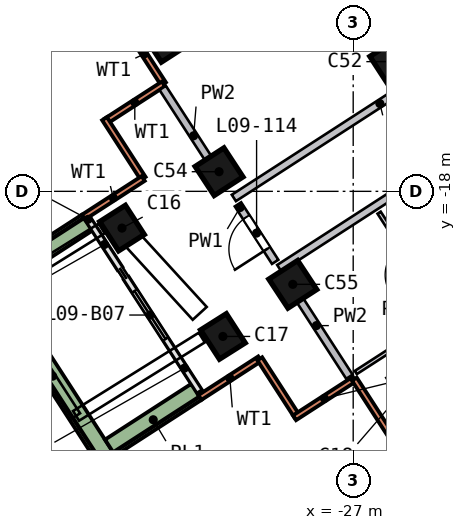
"""IFC4 building model, lengths in metres.
Left out: names, types, materials, properties, quantities, classifications, styles, units other than length and angle.
Written with IfcOpenShell. Run it as: python <this file> out.ifc"""

import sys

from ifc_helpers import new_model, si_unit, direction, frame, frame_2d, origin, origin_2d, place, context, subcontext, project, spatial, rectangle, extrude, element, fill, save


model = new_model("IFC4")
c1 = context("Model", 3, precision=1e-05, world=origin(), true_north=direction((0.0, 1.0)))
c2 = subcontext(c1, "Body", "Model", "MODEL_VIEW")
j1 = project(units=[si_unit("LENGTHUNIT", "METRE"), si_unit("PLANEANGLEUNIT", "RADIAN")], contexts=[c1])
p1 = place(None, origin())
s1 = spatial("IfcSite", under=j1, at=p1, CompositionType="ELEMENT")
p2 = place(p1, origin())
s2 = spatial("IfcBuilding", under=s1, at=p2, CompositionType="ELEMENT")
p3 = place(p2, frame((0.0, 0.0, 46.0)))
s3 = spatial("IfcBuildingStorey", under=s2, at=p3, CompositionType="ELEMENT", Elevation=46.0)
p4 = place(p3, frame((-32.021, -13.865, 0.0), z_axis=(0.106613269, -0.123903948, 0.986550264), x_axis=(-0.837760285, -0.54559437, 0.02201111)))
e1 = element("IfcColumn", 1, at=p4, inside=s3, PredefinedType="COLUMN", context=c2, shape_type="SweptSolid", body=[
    extrude(rectangle(XDim=0.9, YDim=0.8, at=origin_2d()), origin(), (0.0, 0.0, 1.0), 3.233),
])
p5 = place(p3, frame((-33.242, -18.81, 0.0), z_axis=(0.129644072, -0.129042126, 0.983127939), x_axis=(0.528268693, -0.830077524, -0.178615484)))
e2 = element("IfcColumn", 2, at=p5, inside=s3, PredefinedType="COLUMN", context=c2, shape_type="SweptSolid", body=[
    extrude(rectangle(XDim=0.9, YDim=0.8, at=origin_2d()), origin(), (0.0, 0.0, 1.0), 3.245),
])
p6 = place(p3, frame((-30.603, -21.676, 0.0), z_axis=(0.142996831, -0.1164435, 0.982849336), x_axis=(0.52613126, -0.832172984, -0.175140005)))
e3 = element("IfcColumn", 3, at=p6, inside=s3, PredefinedType="COLUMN", context=c2, shape_type="SweptSolid", body=[
    extrude(rectangle(XDim=0.9, YDim=0.8, at=origin_2d()), origin(), (0.0, 0.0, 1.0), 3.246),
])
p7 = place(p3, frame((-25.658, -22.897, 0.0), z_axis=(0.148731573, -0.093352796, 0.984461363), x_axis=(0.831226085, 0.551077806, -0.073324268)))
e4 = element("IfcColumn", 4, at=p7, inside=s3, PredefinedType="COLUMN", context=c2, shape_type="SweptSolid", body=[
    extrude(rectangle(XDim=0.9, YDim=0.8, at=origin_2d()), origin(), (0.0, 0.0, 1.0), 3.24),
])
p8 = place(p3, frame((-26.043, -14.454, 0.0), z_axis=(0.089555062, -0.109405677, 0.98995469), x_axis=(-0.838496243, -0.544682378, 0.015657524)))
e5 = element("IfcColumn", 5, at=p8, inside=s3, PredefinedType="COLUMN", context=c2, shape_type="SweptSolid", body=[
    extrude(rectangle(XDim=0.9, YDim=0.9, at=origin_2d()), origin(), (0.0, 0.0, 1.0), 3.222),
])
p9 = place(p3, frame((-30.679, -17.34, 0.0), z_axis=(0.12286311, -0.117281851, 0.98546924), x_axis=(-0.835614152, -0.547932789, 0.038969843)))
e6 = element("IfcColumn", 6, at=p9, inside=s3, PredefinedType="COLUMN", context=c2, shape_type="SweptSolid", body=[
    extrude(rectangle(XDim=0.9, YDim=0.9, at=origin_2d()), origin(), (0.0, 0.0, 1.0), 3.237),
])
p10 = place(p3, frame((-28.756, -20.315, 0.0), z_axis=(0.13678321, -0.10807004, 0.984688387), x_axis=(-0.833459883, -0.549792202, 0.055436068)))
e7 = element("IfcColumn", 7, at=p10, inside=s3, PredefinedType="COLUMN", context=c2, shape_type="SweptSolid", body=[
    extrude(rectangle(XDim=0.9, YDim=0.9, at=origin_2d()), origin(), (0.0, 0.0, 1.0), 3.24),
])
p11 = place(p3, frame((-33.009, -13.598, 0.0), z_axis=(0.0, 0.0, 1.0), x_axis=(0.542894866, -0.839800669, 0.0)))
e8 = element("IfcWall", 8, at=p11, inside=s3, PredefinedType="SOLIDWALL", context=c2, shape_type="SweptSolid", body=[
    extrude(rectangle(XDim=1.875, YDim=0.15, at=frame_2d((0.938, 0.0))), origin(), (0.0, 0.0, 1.0), 3.19),
])
p12 = place(p3, frame((-31.991, -15.173, 0.0), z_axis=(0.0, 0.0, 1.0), x_axis=(-0.839752067, -0.542970041, 0.0)))
e9 = element("IfcWall", 9, at=p12, inside=s3, PredefinedType="SOLIDWALL", context=c2, shape_type="SweptSolid", body=[
    extrude(rectangle(XDim=1.8, YDim=0.15, at=frame_2d((0.9, 0.0))), origin(), (0.0, 0.0, 1.0), 3.19),
])
p13 = place(p3, frame((-33.543, -16.087, 0.0), z_axis=(0.0, 0.0, 1.0), x_axis=(0.5428355, -0.839839044, 0.0)))
e10 = element("IfcWall", 10, at=p13, inside=s3, PredefinedType="SOLIDWALL", context=c2, shape_type="SweptSolid", body=[
    extrude(rectangle(XDim=1.875, YDim=0.15, at=frame_2d((0.938, 0.0))), origin(), (0.0, 0.0, 1.0), 3.19),
])
p14 = place(p3, frame((-32.526, -17.662, 0.0), z_axis=(0.0, 0.0, 1.0), x_axis=(-0.839800669, -0.542894866, 0.0)))
e11 = element("IfcWall", 11, at=p14, inside=s3, PredefinedType="SOLIDWALL", context=c2, shape_type="SweptSolid", body=[
    extrude(rectangle(XDim=1.875, YDim=0.15, at=frame_2d((0.938, 0.0))), origin(), (0.0, 0.0, 1.0), 3.19),
])
p15 = place(p3, frame((-31.033, -23.425, 0.0), z_axis=(0.0, 0.0, 1.0), x_axis=(0.839839044, 0.5428355, 0.0)))
e12 = element("IfcWall", 12, at=p15, inside=s3, PredefinedType="SOLIDWALL", context=c2, shape_type="SweptSolid", body=[
    extrude(rectangle(XDim=1.875, YDim=0.15, at=frame_2d((0.938, 0.0))), origin(), (0.0, 0.0, 1.0), 3.19),
])
p16 = place(p3, frame((-29.458, -22.407, 0.0), z_axis=(0.0, 0.0, 1.0), x_axis=(0.54281254, -0.839853884, 0.0)))
e13 = element("IfcWall", 13, at=p16, inside=s3, PredefinedType="SOLIDWALL", context=c2, shape_type="SweptSolid", body=[
    extrude(rectangle(XDim=1.8, YDim=0.15, at=frame_2d((0.9, 0.0))), origin(), (0.0, 0.0, 1.0), 3.19),
])
p17 = place(p3, frame((-28.544, -23.959, 0.0), z_axis=(0.0, 0.0, 1.0), x_axis=(0.839839044, 0.5428355, 0.0)))
e14 = element("IfcWall", 14, at=p17, inside=s3, PredefinedType="SOLIDWALL", context=c2, shape_type="SweptSolid", body=[
    extrude(rectangle(XDim=1.875, YDim=0.15, at=frame_2d((0.938, 0.0))), origin(), (0.0, 0.0, 1.0), 3.19),
])
p18 = place(p3, frame((-26.969, -22.941, 0.0), z_axis=(0.0, 0.0, 1.0), x_axis=(0.54292733, -0.839779682, 0.0)))
e15 = element("IfcWall", 15, at=p18, inside=s3, PredefinedType="SOLIDWALL", context=c2, shape_type="SweptSolid", body=[
    extrude(rectangle(XDim=1.875, YDim=0.15, at=frame_2d((0.938, 0.0))), origin(), (0.0, 0.0, 1.0), 3.19),
])
p19 = place(p3, frame((-32.97, -20.289, 0.0), z_axis=(0.0, 0.0, 1.0), x_axis=(0.542849741, -0.839829839, 0.0)))
e16 = element("IfcWall", 16, at=p19, inside=s3, PredefinedType="SOLIDWALL", context=c2, shape_type="SweptSolid", body=[
    extrude(rectangle(XDim=3.53, YDim=0.15, at=frame_2d((1.765, 0.0))), origin(), (0.0, 0.0, 1.0), 2.425),
])
p20 = place(p19, frame((0.4, 0.0, 0.0)))
e17 = element("IfcOpeningElement", 17, at=p20, cuts=e16, PredefinedType="OPENING", context=c2, shape_type="SweptSolid", body=[
    extrude(rectangle(XDim=1.5, YDim=2.4, at=frame_2d((0.75, 1.2))), frame((0.0, 0.085, 0.0), z_axis=(0.0, -1.0, 0.0), x_axis=(1.0, 0.0, 0.0)), (0.0, 0.0, 1.0), 0.17),
])
p21 = place(p3, frame((-33.953, -18.769, 0.0), z_axis=(0.0, 0.0, 1.0), x_axis=(0.54292733, -0.839779682, 0.0)))
e18 = element("IfcWall", 18, at=p21, inside=s3, PredefinedType="SOLIDWALL", context=c2, shape_type="SweptSolid", body=[
    extrude(rectangle(XDim=1.5, YDim=0.15, at=frame_2d((0.75, 0.0))), origin(), (0.0, 0.0, 1.0), 2.425),
])
p22 = place(p3, frame((-34.006, -18.827, 0.0), z_axis=(0.0, 0.0, 1.0), x_axis=(-0.839787127, -0.542915814, 0.0)))
e19 = element("IfcWall", 19, at=p22, inside=s3, PredefinedType="SOLIDWALL", context=c2, shape_type="SweptSolid", body=[
    extrude(rectangle(XDim=3.199, YDim=0.5, at=frame_2d((1.6, 0.0))), origin(), (0.0, 0.0, 1.0), 0.7),
])
p23 = place(p3, frame((-36.347, -20.638, 0.0), z_axis=(0.0, 0.0, 1.0), x_axis=(0.542876861, -0.839812309, 0.0)))
e20 = element("IfcWall", 20, at=p23, inside=s3, PredefinedType="SOLIDWALL", context=c2, shape_type="SweptSolid", body=[
    extrude(rectangle(XDim=5.3, YDim=0.5, at=frame_2d((2.65, 0.0))), origin(), (0.0, 0.0, 1.0), 0.7),
])
p24 = place(p3, frame((-33.396, -24.743, 0.0), z_axis=(0.0, 0.0, 1.0), x_axis=(0.839815165, 0.542872442, 0.0)))
e21 = element("IfcWall", 21, at=p24, inside=s3, PredefinedType="SOLIDWALL", context=c2, shape_type="SweptSolid", body=[
    extrude(rectangle(XDim=2.699, YDim=0.5, at=frame_2d((1.35, 0.0))), origin(), (0.0, 0.0, 1.0), 0.7),
])
p25 = place(p3, frame((-29.054, -19.855, 0.0), z_axis=(0.0, 0.0, 1.0), x_axis=(-0.54276244, 0.839886262, 0.0)))
e22 = element("IfcWall", 22, at=p25, inside=s3, PredefinedType="SOLIDWALL", context=c2, shape_type="SweptSolid", body=[
    extrude(rectangle(XDim=1.802, YDim=0.2, at=frame_2d((0.901, 0.0))), origin(), (0.0, 0.0, 1.0), 3.19),
])
p26 = place(p25, frame((0.4, 0.0, 0.0)))
e23 = element("IfcOpeningElement", 23, at=p26, cuts=e22, PredefinedType="OPENING", context=c2, shape_type="SweptSolid", body=[
    extrude(rectangle(XDim=1.0, YDim=2.1, at=frame_2d((0.5, 1.05))), frame((0.0, 0.11, 0.0), z_axis=(0.0, -1.0, 0.0), x_axis=(1.0, 0.0, 0.0)), (0.0, 0.0, 1.0), 0.22),
])
p27 = place(p3, frame((-30.14, -18.174, 0.0), z_axis=(0.0, 0.0, 1.0), x_axis=(0.839812753, 0.542876173, 0.0)))
e24 = element("IfcWall", 24, at=p27, inside=s3, PredefinedType="SOLIDWALL", context=c2, shape_type="SweptSolid", body=[
    extrude(rectangle(XDim=17.22, YDim=0.2, at=frame_2d((8.61, 0.0))), origin(), (0.0, 0.0, 1.0), 3.19),
])
p28 = place(p27, frame((9.35, 0.0, 0.0)))
e25 = element("IfcOpeningElement", 25, at=p28, cuts=e24, PredefinedType="OPENING", context=c2, shape_type="SweptSolid", body=[
    extrude(rectangle(XDim=1.0, YDim=2.1, at=frame_2d((0.5, 1.05))), frame((0.0, 0.11, 0.0), z_axis=(0.0, -1.0, 0.0), x_axis=(1.0, 0.0, 0.0)), (0.0, 0.0, 1.0), 0.22),
])
p29 = place(p3, frame((-14.316, -10.564, 0.0), z_axis=(0.0, 0.0, 1.0), x_axis=(-0.839811096, -0.542878738, 0.0)))
e26 = element("IfcWall", 26, at=p29, inside=s3, PredefinedType="SOLIDWALL", context=c2, shape_type="SweptSolid", body=[
    extrude(rectangle(XDim=17.42, YDim=0.2, at=frame_2d((8.71, 0.0))), origin(), (0.0, 0.0, 1.0), 3.19),
])
p30 = place(p29, frame((12.7, 0.0, 0.0)))
e27 = element("IfcOpeningElement", 27, at=p30, cuts=e26, PredefinedType="OPENING", context=c2, shape_type="SweptSolid", body=[
    extrude(rectangle(XDim=1.0, YDim=2.1, at=frame_2d((0.5, 1.05))), frame((0.0, 0.11, 0.0), z_axis=(0.0, -1.0, 0.0), x_axis=(1.0, 0.0, 0.0)), (0.0, 0.0, 1.0), 0.22),
])
p31 = place(p3, frame((-32.013, -15.277, 0.0), z_axis=(0.0, 0.0, 1.0), x_axis=(0.54288039, -0.839810027, 0.0)))
e28 = element("IfcWall", 28, at=p31, inside=s3, PredefinedType="SOLIDWALL", context=c2, shape_type="SweptSolid", body=[
    extrude(rectangle(XDim=3.003, YDim=0.2, at=frame_2d((1.501, 0.0))), origin(), (0.0, 0.0, 1.0), 3.19),
])
p32 = place(p3, frame((-28.839, -20.188, 0.0), z_axis=(0.0, 0.0, 1.0), x_axis=(0.542881592, -0.83980925, 0.0)))
e29 = element("IfcWall", 29, at=p32, inside=s3, PredefinedType="SOLIDWALL", context=c2, shape_type="SweptSolid", body=[
    extrude(rectangle(XDim=3.204, YDim=0.2, at=frame_2d((1.602, 0.0))), origin(), (0.0, 0.0, 1.0), 3.19),
])
p33 = place(p3, frame((-24.665, -21.302, 0.0), z_axis=(0.0, 0.0, 1.0), x_axis=(-0.839812661, -0.542876316, 0.0)))
e30 = element("IfcWall", 30, at=p33, inside=s3, PredefinedType="PARTITIONING", context=c2, shape_type="SweptSolid", body=[
    extrude(rectangle(XDim=2.7, YDim=0.1, at=frame_2d((1.35, 0.0))), origin(), (0.0, 0.0, 1.0), 3.19),
])
p34 = place(p3, frame((-24.581, -21.248, 0.0), z_axis=(0.0, 0.0, 1.0), x_axis=(-0.542884287, 0.839807508, 0.0)))
e31 = element("IfcWall", 31, at=p34, inside=s3, PredefinedType="PARTITIONING", context=c2, shape_type="SweptSolid", body=[
    extrude(rectangle(XDim=3.2, YDim=0.1, at=frame_2d((1.6, 0.0))), origin(), (0.0, 0.0, 1.0), 3.19),
])
p35 = place(p34, frame((1.25, 0.0, 0.0)))
e32 = element("IfcOpeningElement", 32, at=p35, cuts=e31, PredefinedType="OPENING", context=c2, shape_type="SweptSolid", body=[
    extrude(rectangle(XDim=0.9, YDim=2.1, at=frame_2d((0.45, 1.05))), frame((0.0, 0.06, 0.0), z_axis=(0.0, -1.0, 0.0), x_axis=(1.0, 0.0, 0.0)), (0.0, 0.0, 1.0), 0.12),
])
p36 = place(p20, origin())
e33 = element("IfcDoor", 33, at=p36, inside=s3, OperationType="SLIDING_TO_RIGHT", PredefinedType="DOOR", context=c2, shape_type="SweptSolid", body=[
    extrude(rectangle(XDim=1.5, YDim=2.4, at=frame_2d((0.75, 1.2))), frame((0.0, 0.025, 0.0), z_axis=(0.0, -1.0, 0.0), x_axis=(1.0, 0.0, 0.0)), (0.0, 0.0, 1.0), 0.05),
])
fill(e17, e33)
p37 = place(p26, origin())
e34 = element("IfcDoor", 34, at=p37, inside=s3, OperationType="SINGLE_SWING_LEFT", PredefinedType="DOOR", context=c2, shape_type="SweptSolid", body=[
    extrude(rectangle(XDim=1.0, YDim=2.1, at=frame_2d((0.5, 1.05))), frame((0.0, 0.025, 0.0), z_axis=(0.0, -1.0, 0.0), x_axis=(1.0, 0.0, 0.0)), (0.0, 0.0, 1.0), 0.05),
])
fill(e23, e34)
save(model, sys.argv[1])
